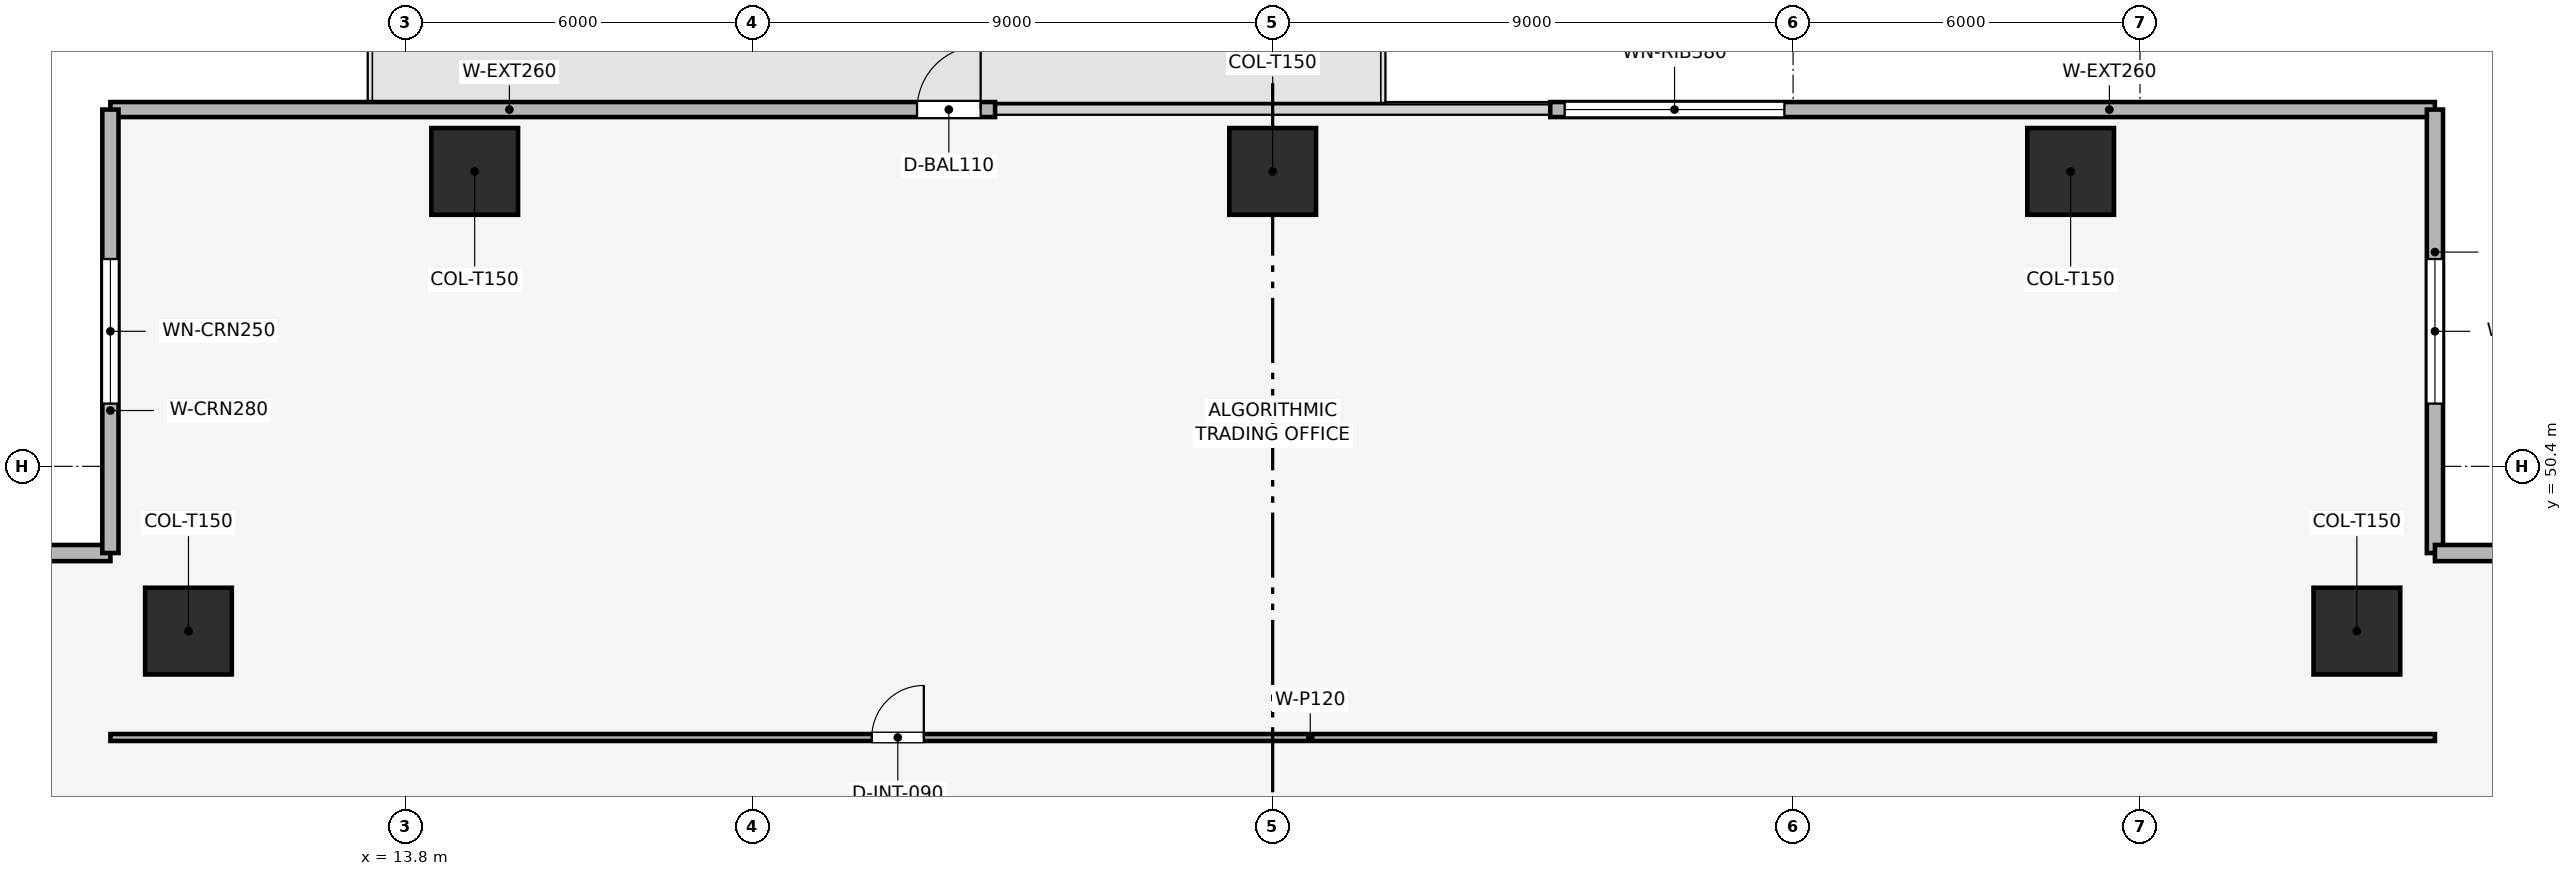
"""IFC4 building model, lengths in metres.
Left out: names, types, materials, properties, quantities, classifications, styles, units other than length and angle.
Written with IfcOpenShell. Run it as: python <this file> out.ifc"""

import sys

from ifc_helpers import new_model, si_unit, direction, frame, frame_2d, origin, origin_2d, place, context, subcontext, project, spatial, rectangle, extrude, element, fill, save


model = new_model("IFC4")
c1 = context("Model", 3, precision=1e-05, world=origin(), true_north=direction((0.0, 1.0)))
c2 = subcontext(c1, "Body", "Model", "MODEL_VIEW")
j1 = project(units=[si_unit("LENGTHUNIT", "METRE"), si_unit("PLANEANGLEUNIT", "RADIAN")], contexts=[c1])
p1 = place(None, origin())
s1 = spatial("IfcSite", under=j1, at=p1, CompositionType="ELEMENT")
p2 = place(p1, origin())
s2 = spatial("IfcBuilding", under=s1, at=p2, CompositionType="ELEMENT")
p3 = place(p2, frame((0.0, 0.0, 37.8)))
s3 = spatial("IfcBuildingStorey", under=s2, at=p3, CompositionType="ELEMENT", Elevation=37.8)
for number, where, z_axis, x_axis in (
    (1, (42.6, 55.5, 0.003), (0.0, 0.0, 1.0), (1.0, 0.0, 0.0)),
    (2, (28.8, 55.5, 0.003), (0.0, 0.0, 1.0), (1.0, 0.0, 0.0)),
    (3, (15.0, 55.5, 0.003), (0.0, 0.0, 1.0), (1.0, 0.0, 0.0)),
    (4, (47.55, 47.55, 0.003), (0.0, 0.0, 1.0), (1.0, 0.0, 0.0)),
    (5, (10.05, 47.55, 0.003), (0.0, 0.0, 1.0), (1.0, 0.0, 0.0)),
):
    element("IfcColumn", number, at=place(p3, frame(where, z_axis=z_axis, x_axis=x_axis)), inside=s3, PredefinedType="COLUMN", context=c2, shape_type="SweptSolid", body=[
        extrude(rectangle(XDim=1.5, YDim=1.5, at=origin_2d()), origin(), (0.0, 0.0, 1.0), 3.644),
    ])
p4 = place(p3, frame((8.7, 56.57, 0.0), z_axis=(0.0, 0.0, 1.0), x_axis=(1.0, 0.0, 0.0)))
e6 = element("IfcWall", 6, at=p4, inside=s3, PredefinedType="SOLIDWALL", context=c2, shape_type="SweptSolid", body=[
    extrude(rectangle(XDim=15.3, YDim=0.26, at=frame_2d((7.65, 0.0))), origin(), (0.0, 0.0, 1.0), 3.65),
])
p5 = place(p4, frame((13.95, 0.0, 0.0)))
e7 = element("IfcOpeningElement", 7, at=p5, cuts=e6, PredefinedType="OPENING", context=c2, shape_type="SweptSolid", body=[
    extrude(rectangle(XDim=1.1, YDim=2.2, at=frame_2d((0.55, 1.1))), frame((0.0, 0.14, 0.0), z_axis=(0.0, -1.0, 0.0), x_axis=(1.0, 0.0, 0.0)), (0.0, 0.0, 1.0), 0.28),
])
p6 = place(p3, frame((33.6, 56.57, 0.0), z_axis=(0.0, 0.0, 1.0), x_axis=(1.0, 0.0, 0.0)))
e8 = element("IfcWall", 8, at=p6, inside=s3, PredefinedType="SOLIDWALL", context=c2, shape_type="SweptSolid", body=[
    extrude(rectangle(XDim=15.3, YDim=0.26, at=frame_2d((7.65, 0.0))), origin(), (0.0, 0.0, 1.0), 3.65),
])
p7 = place(p6, frame((0.25, 0.0, 0.9)))
e9 = element("IfcOpeningElement", 9, at=p7, cuts=e8, PredefinedType="OPENING", context=c2, shape_type="SweptSolid", body=[
    extrude(rectangle(XDim=3.8, YDim=1.9, at=frame_2d((1.9, 0.95))), frame((0.0, 0.14, 0.0), z_axis=(0.0, -1.0, 0.0), x_axis=(1.0, 0.0, 0.0)), (0.0, 0.0, 1.0), 0.28),
])
p8 = place(p3, frame((1.03, 48.9, 0.0), z_axis=(0.0, 0.0, 1.0), x_axis=(1.0, 0.0, 0.0)))
e10 = element("IfcWall", 10, at=p8, inside=s3, PredefinedType="SOLIDWALL", context=c2, shape_type="SweptSolid", body=[
    extrude(rectangle(XDim=7.67, YDim=0.28, at=frame_2d((3.835, 0.0))), origin(), (0.0, 0.0, 1.0), 3.65),
])
p9 = place(p8, frame((2.585, 0.0, 0.9)))
e11 = element("IfcOpeningElement", 11, at=p9, cuts=e10, PredefinedType="OPENING", context=c2, shape_type="SweptSolid", body=[
    extrude(rectangle(XDim=2.5, YDim=1.9, at=frame_2d((1.25, 0.95))), frame((0.0, 0.15, 0.0), z_axis=(0.0, -1.0, 0.0), x_axis=(1.0, 0.0, 0.0)), (0.0, 0.0, 1.0), 0.3),
])
p10 = place(p3, frame((8.7, 48.9, 0.0), z_axis=(0.0, 0.0, 1.0), x_axis=(0.0, 1.0, 0.0)))
e12 = element("IfcWall", 12, at=p10, inside=s3, PredefinedType="SOLIDWALL", context=c2, shape_type="SweptSolid", body=[
    extrude(rectangle(XDim=7.67, YDim=0.28, at=frame_2d((3.835, 0.0))), origin(), (0.0, 0.0, 1.0), 3.65),
])
p11 = place(p10, frame((2.585, 0.0, 0.9)))
e13 = element("IfcOpeningElement", 13, at=p11, cuts=e12, PredefinedType="OPENING", context=c2, shape_type="SweptSolid", body=[
    extrude(rectangle(XDim=2.5, YDim=1.9, at=frame_2d((1.25, 0.95))), frame((0.0, 0.15, 0.0), z_axis=(0.0, -1.0, 0.0), x_axis=(1.0, 0.0, 0.0)), (0.0, 0.0, 1.0), 0.3),
])
p12 = place(p3, frame((48.9, 56.57, 0.0), z_axis=(0.0, 0.0, 1.0), x_axis=(0.0, -1.0, 0.0)))
e14 = element("IfcWall", 14, at=p12, inside=s3, PredefinedType="SOLIDWALL", context=c2, shape_type="SweptSolid", body=[
    extrude(rectangle(XDim=7.67, YDim=0.28, at=frame_2d((3.835, 0.0))), origin(), (0.0, 0.0, 1.0), 3.65),
])
p13 = place(p12, frame((2.585, 0.0, 0.9)))
e15 = element("IfcOpeningElement", 15, at=p13, cuts=e14, PredefinedType="OPENING", context=c2, shape_type="SweptSolid", body=[
    extrude(rectangle(XDim=2.5, YDim=1.9, at=frame_2d((1.25, 0.95))), frame((0.0, 0.15, 0.0), z_axis=(0.0, -1.0, 0.0), x_axis=(1.0, 0.0, 0.0)), (0.0, 0.0, 1.0), 0.3),
])
p14 = place(p3, frame((48.9, 48.9, 0.0), z_axis=(0.0, 0.0, 1.0), x_axis=(1.0, 0.0, 0.0)))
e16 = element("IfcWall", 16, at=p14, inside=s3, PredefinedType="SOLIDWALL", context=c2, shape_type="SweptSolid", body=[
    extrude(rectangle(XDim=7.67, YDim=0.28, at=frame_2d((3.835, 0.0))), origin(), (0.0, 0.0, 1.0), 3.65),
])
p15 = place(p14, frame((2.585, 0.0, 0.9)))
e17 = element("IfcOpeningElement", 17, at=p15, cuts=e16, PredefinedType="OPENING", context=c2, shape_type="SweptSolid", body=[
    extrude(rectangle(XDim=2.5, YDim=1.9, at=frame_2d((1.25, 0.95))), frame((0.0, 0.15, 0.0), z_axis=(0.0, -1.0, 0.0), x_axis=(1.0, 0.0, 0.0)), (0.0, 0.0, 1.0), 0.3),
])
p16 = place(p3, frame((8.7, 45.71, 0.0), z_axis=(0.0, 0.0, 1.0), x_axis=(1.0, 0.0, 0.0)))
e18 = element("IfcWall", 18, at=p16, inside=s3, PredefinedType="PARTITIONING", context=c2, shape_type="SweptSolid", body=[
    extrude(rectangle(XDim=40.2, YDim=0.12, at=frame_2d((20.1, 0.0))), origin(), (0.0, 0.0, 1.0), 3.085),
])
p17 = place(p16, frame((13.167, 0.0, 0.0)))
e19 = element("IfcOpeningElement", 19, at=p17, cuts=e18, PredefinedType="OPENING", context=c2, shape_type="SweptSolid", body=[
    extrude(rectangle(XDim=0.9, YDim=2.1, at=frame_2d((0.45, 1.05))), frame((0.0, 0.07, 0.0), z_axis=(0.0, -1.0, 0.0), x_axis=(1.0, 0.0, 0.0)), (0.0, 0.0, 1.0), 0.14),
])
p18 = place(p5, origin())
e20 = element("IfcDoor", 20, at=p18, inside=s3, OperationType="SINGLE_SWING_RIGHT", PredefinedType="DOOR", context=c2, shape_type="SweptSolid", body=[
    extrude(rectangle(XDim=1.1, YDim=2.2, at=frame_2d((0.55, 1.1))), frame((0.0, 0.025, 0.0), z_axis=(0.0, -1.0, 0.0), x_axis=(1.0, 0.0, 0.0)), (0.0, 0.0, 1.0), 0.05),
])
fill(e7, e20)
p19 = place(p7, origin())
e21 = element("IfcWindow", 21, at=p19, inside=s3, PartitioningType="SINGLE_PANEL", PredefinedType="WINDOW", context=c2, shape_type="SweptSolid", body=[
    extrude(rectangle(XDim=3.8, YDim=1.9, at=frame_2d((1.9, 0.95))), frame((0.0, 0.03, 0.0), z_axis=(0.0, -1.0, 0.0), x_axis=(1.0, 0.0, 0.0)), (0.0, 0.0, 1.0), 0.06),
])
fill(e9, e21)
p20 = place(p11, origin())
e22 = element("IfcWindow", 22, at=p20, inside=s3, PartitioningType="SINGLE_PANEL", PredefinedType="WINDOW", context=c2, shape_type="SweptSolid", body=[
    extrude(rectangle(XDim=2.5, YDim=1.9, at=frame_2d((1.25, 0.95))), frame((0.0, 0.03, 0.0), z_axis=(0.0, -1.0, 0.0), x_axis=(1.0, 0.0, 0.0)), (0.0, 0.0, 1.0), 0.06),
])
fill(e13, e22)
p21 = place(p13, origin())
e23 = element("IfcWindow", 23, at=p21, inside=s3, PartitioningType="SINGLE_PANEL", PredefinedType="WINDOW", context=c2, shape_type="SweptSolid", body=[
    extrude(rectangle(XDim=2.5, YDim=1.9, at=frame_2d((1.25, 0.95))), frame((0.0, 0.03, 0.0), z_axis=(0.0, -1.0, 0.0), x_axis=(1.0, 0.0, 0.0)), (0.0, 0.0, 1.0), 0.06),
])
fill(e15, e23)
p22 = place(p17, origin())
e24 = element("IfcDoor", 24, at=p22, inside=s3, OperationType="SINGLE_SWING_RIGHT", PredefinedType="DOOR", context=c2, shape_type="SweptSolid", body=[
    extrude(rectangle(XDim=0.9, YDim=2.1, at=frame_2d((0.45, 1.05))), frame((0.0, 0.025, 0.0), z_axis=(0.0, -1.0, 0.0), x_axis=(1.0, 0.0, 0.0)), (0.0, 0.0, 1.0), 0.05),
])
fill(e19, e24)
save(model, sys.argv[1])
